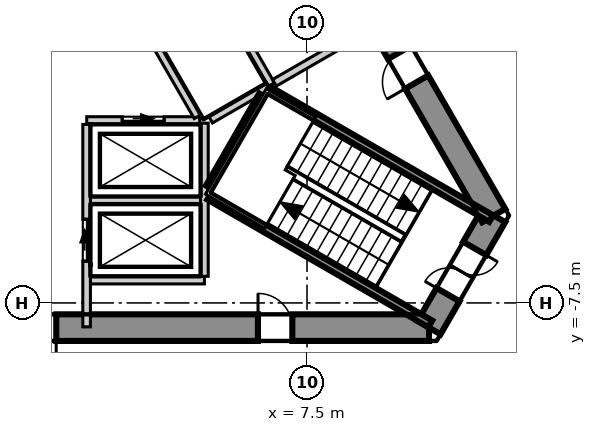
"""IFC4 building model, lengths in metres.
Left out: names, types, materials, properties, quantities, classifications, styles, units other than length and angle.
Written with IfcOpenShell. Run it as: python <this file> out.ifc"""

import sys

from ifc_helpers import new_model, si_unit, direction, frame, frame_2d, origin, place, context, subcontext, project, spatial, polyline, rectangle, outline, extrude, element, fill, save


model = new_model("IFC4")
c1 = context("Model", 3, precision=1e-05, world=origin(), true_north=direction((0.0, 1.0)))
c2 = subcontext(c1, "Body", "Model", "MODEL_VIEW")
j1 = project(units=[si_unit("LENGTHUNIT", "METRE"), si_unit("PLANEANGLEUNIT", "RADIAN")], contexts=[c1])
p1 = place(None, origin())
s1 = spatial("IfcSite", under=j1, at=p1, CompositionType="ELEMENT")
p2 = place(p1, origin())
s2 = spatial("IfcBuilding", under=s1, at=p2, CompositionType="ELEMENT")
p3 = place(p2, frame((0.0, 0.0, 215.3)))
s3 = spatial("IfcBuildingStorey", under=s2, at=p3, CompositionType="ELEMENT", Elevation=215.3)
p4 = place(p3, frame((-10.71, -8.15, -0.3), z_axis=(0.0, 0.0, 1.0), x_axis=(1.0, 0.0, 0.0)))
e1 = element("IfcWall", 1, at=p4, inside=s3, PredefinedType="SHEAR", context=c2, shape_type="SweptSolid", body=[
    extrude(outline(polyline([(-0.202, -0.35), (1.782, -0.35), (3.766, -0.35), (5.75, -0.35), (7.734, -0.35), (9.718, -0.35), (11.702, -0.35), (13.686, -0.35), (15.67, -0.35), (17.654, -0.35), (19.638, -0.35), (21.622, -0.35), (21.218, 0.35), (19.307, 0.35), (17.397, 0.35), (15.486, 0.35), (13.576, 0.35), (11.665, 0.35), (9.755, 0.35), (7.844, 0.35), (5.934, 0.35), (4.023, 0.35), (2.113, 0.35), (0.202, 0.35), (-0.202, -0.35)])), origin(), (0.0, 0.0, 1.0), 4.0),
])
p5 = place(p4, frame((9.81, 0.0, 0.3)))
e2 = element("IfcOpeningElement", 2, at=p5, cuts=e1, PredefinedType="OPENING", context=c2, shape_type="SweptSolid", body=[
    extrude(rectangle(XDim=1.8, YDim=2.1, at=frame_2d((0.9, 1.05))), frame((0.0, 0.36, 0.0), z_axis=(0.0, -1.0, 0.0), x_axis=(1.0, 0.0, 0.0)), (0.0, 0.0, 1.0), 0.72),
])
p6 = place(p4, frame((16.921, 0.0, 0.3)))
e3 = element("IfcOpeningElement", 3, at=p6, cuts=e1, PredefinedType="OPENING", context=c2, shape_type="SweptSolid", body=[
    extrude(rectangle(XDim=0.9, YDim=2.1, at=frame_2d((0.45, 1.05))), frame((0.0, 0.36, 0.0), z_axis=(0.0, -1.0, 0.0), x_axis=(1.0, 0.0, 0.0)), (0.0, 0.0, 1.0), 0.72),
])
p7 = place(p3, frame((10.71, -8.15, -0.3), z_axis=(0.0, 0.0, 1.0), x_axis=(0.49999337185, 0.866029230515, 0.0)))
e4 = element("IfcWall", 4, at=p7, inside=s3, PredefinedType="SHEAR", context=c2, shape_type="SweptSolid", body=[
    extrude(outline(polyline([(-0.202, -0.35), (1.703, -0.35), (3.608, -0.35), (3.204, 0.35), (1.703, 0.35), (0.202, 0.35), (-0.202, -0.35)])), origin(), (0.0, 0.0, 1.0), 4.0),
])
p8 = place(p7, frame((1.003, 0.0, 0.3)))
e5 = element("IfcOpeningElement", 5, at=p8, cuts=e4, PredefinedType="OPENING", context=c2, shape_type="SweptSolid", body=[
    extrude(rectangle(XDim=1.4, YDim=2.1, at=frame_2d((0.7, 1.05))), frame((0.0, 0.36, 0.0), z_axis=(0.0, -1.0, 0.0), x_axis=(1.0, 0.0, 0.0)), (0.0, 0.0, 1.0), 0.72),
])
p9 = place(p3, frame((12.413, -5.2, -0.3), z_axis=(0.0, 0.0, 1.0), x_axis=(-0.500011533395, 0.866018744874, 0.0)))
e6 = element("IfcWall", 6, at=p9, inside=s3, PredefinedType="SHEAR", context=c2, shape_type="SweptSolid", body=[
    extrude(outline(polyline([(-0.202, -0.35), (1.782, -0.35), (3.766, -0.35), (5.75, -0.35), (7.734, -0.35), (9.718, -0.35), (11.702, -0.35), (13.686, -0.35), (15.67, -0.35), (17.654, -0.35), (19.638, -0.35), (21.622, -0.35), (21.218, 0.35), (19.307, 0.35), (17.397, 0.35), (15.486, 0.35), (13.576, 0.35), (11.665, 0.35), (9.755, 0.35), (7.844, 0.35), (5.934, 0.35), (4.023, 0.35), (2.113, 0.35), (0.202, 0.35), (-0.202, -0.35)])), origin(), (0.0, 0.0, 1.0), 4.0),
])
p10 = place(p9, frame((4.055, 0.0, 0.3)))
e7 = element("IfcOpeningElement", 7, at=p10, cuts=e6, PredefinedType="OPENING", context=c2, shape_type="SweptSolid", body=[
    extrude(rectangle(XDim=0.9, YDim=2.1, at=frame_2d((0.45, 1.05))), frame((0.0, 0.36, 0.0), z_axis=(0.0, -1.0, 0.0), x_axis=(1.0, 0.0, 0.0)), (0.0, 0.0, 1.0), 0.72),
])
p11 = place(p9, frame((16.465, 0.0, 0.3)))
e8 = element("IfcOpeningElement", 8, at=p11, cuts=e6, PredefinedType="OPENING", context=c2, shape_type="SweptSolid", body=[
    extrude(rectangle(XDim=0.9, YDim=2.1, at=frame_2d((0.45, 1.05))), frame((0.0, 0.36, 0.0), z_axis=(0.0, -1.0, 0.0), x_axis=(1.0, 0.0, 0.0)), (0.0, 0.0, 1.0), 0.72),
])
p12 = place(p3, frame((28.243, -13.098, 0.0), z_axis=(0.0, 0.0, 1.0), x_axis=(-0.500001688958, 0.866024428662, 0.0)))
e9 = element("IfcWall", 9, at=p12, inside=s3, PredefinedType="ELEMENTEDWALL", context=c2, shape_type="SweptSolid", body=[
    extrude(rectangle(XDim=50.909, YDim=0.2, at=frame_2d((25.455, 0.0))), origin(), (0.0, 0.0, 1.0), 3.7),
])
p13 = place(p12, frame((2.223, 0.0, 0.9)))
e10 = element("IfcOpeningElement", 10, at=p13, cuts=e9, PredefinedType="OPENING", context=c2, shape_type="SweptSolid", body=[
    extrude(rectangle(XDim=4.2, YDim=2.5, at=frame_2d((2.1, 1.25))), frame((0.0, 0.11, 0.0), z_axis=(0.0, -1.0, 0.0), x_axis=(1.0, 0.0, 0.0)), (0.0, 0.0, 1.0), 0.22),
])
p14 = place(p12, frame((8.263, 0.0, 0.9)))
e11 = element("IfcOpeningElement", 11, at=p14, cuts=e9, PredefinedType="OPENING", context=c2, shape_type="SweptSolid", body=[
    extrude(rectangle(XDim=4.2, YDim=2.5, at=frame_2d((2.1, 1.25))), frame((0.0, 0.11, 0.0), z_axis=(0.0, -1.0, 0.0), x_axis=(1.0, 0.0, 0.0)), (0.0, 0.0, 1.0), 0.22),
])
p15 = place(p12, frame((14.304, 0.0, 0.9)))
e12 = element("IfcOpeningElement", 12, at=p15, cuts=e9, PredefinedType="OPENING", context=c2, shape_type="SweptSolid", body=[
    extrude(rectangle(XDim=4.2, YDim=2.5, at=frame_2d((2.1, 1.25))), frame((0.0, 0.11, 0.0), z_axis=(0.0, -1.0, 0.0), x_axis=(1.0, 0.0, 0.0)), (0.0, 0.0, 1.0), 0.22),
])
p16 = place(p12, frame((20.345, 0.0, 0.9)))
e13 = element("IfcOpeningElement", 13, at=p16, cuts=e9, PredefinedType="OPENING", context=c2, shape_type="SweptSolid", body=[
    extrude(rectangle(XDim=4.2, YDim=2.5, at=frame_2d((2.1, 1.25))), frame((0.0, 0.11, 0.0), z_axis=(0.0, -1.0, 0.0), x_axis=(1.0, 0.0, 0.0)), (0.0, 0.0, 1.0), 0.22),
])
p17 = place(p12, frame((26.385, 0.0, 0.9)))
e14 = element("IfcOpeningElement", 14, at=p17, cuts=e9, PredefinedType="OPENING", context=c2, shape_type="SweptSolid", body=[
    extrude(rectangle(XDim=4.2, YDim=2.5, at=frame_2d((2.1, 1.25))), frame((0.0, 0.11, 0.0), z_axis=(0.0, -1.0, 0.0), x_axis=(1.0, 0.0, 0.0)), (0.0, 0.0, 1.0), 0.22),
])
p18 = place(p12, frame((32.426, 0.0, 0.9)))
e15 = element("IfcOpeningElement", 15, at=p18, cuts=e9, PredefinedType="OPENING", context=c2, shape_type="SweptSolid", body=[
    extrude(rectangle(XDim=4.2, YDim=2.5, at=frame_2d((2.1, 1.25))), frame((0.0, 0.11, 0.0), z_axis=(0.0, -1.0, 0.0), x_axis=(1.0, 0.0, 0.0)), (0.0, 0.0, 1.0), 0.22),
])
p19 = place(p12, frame((38.466, 0.0, 0.9)))
e16 = element("IfcOpeningElement", 16, at=p19, cuts=e9, PredefinedType="OPENING", context=c2, shape_type="SweptSolid", body=[
    extrude(rectangle(XDim=4.2, YDim=2.5, at=frame_2d((2.1, 1.25))), frame((0.0, 0.11, 0.0), z_axis=(0.0, -1.0, 0.0), x_axis=(1.0, 0.0, 0.0)), (0.0, 0.0, 1.0), 0.22),
])
p20 = place(p12, frame((44.507, 0.0, 0.9)))
e17 = element("IfcOpeningElement", 17, at=p20, cuts=e9, PredefinedType="OPENING", context=c2, shape_type="SweptSolid", body=[
    extrude(rectangle(XDim=4.2, YDim=2.5, at=frame_2d((2.1, 1.25))), frame((0.0, 0.11, 0.0), z_axis=(0.0, -1.0, 0.0), x_axis=(1.0, 0.0, 0.0)), (0.0, 0.0, 1.0), 0.22),
])
p21 = place(p3, frame((0.075, 24.07, 0.0), z_axis=(0.0, 0.0, 1.0), x_axis=(0.500006834213, -0.866021458014, 0.0)))
e18 = element("IfcWall", 18, at=p21, inside=s3, PredefinedType="PARTITIONING", context=c2, shape_type="SweptSolid", body=[
    extrude(rectangle(XDim=41.616, YDim=0.15, at=frame_2d((20.808, 0.0))), origin(), (0.0, 0.0, 1.0), 3.7),
])
p22 = place(p21, frame((33.715, 0.0, 0.0)))
e19 = element("IfcOpeningElement", 19, at=p22, cuts=e18, PredefinedType="OPENING", context=c2, shape_type="SweptSolid", body=[
    extrude(rectangle(XDim=1.1, YDim=2.1, at=frame_2d((0.55, 1.05))), frame((0.0, 0.085, 0.0), z_axis=(0.0, -1.0, 0.0), x_axis=(1.0, 0.0, 0.0)), (0.0, 0.0, 1.0), 0.17),
])
p23 = place(p21, frame((22.098, 0.0, 0.0)))
e20 = element("IfcOpeningElement", 20, at=p23, cuts=e18, PredefinedType="OPENING", context=c2, shape_type="SweptSolid", body=[
    extrude(rectangle(XDim=1.0, YDim=2.1, at=frame_2d((0.5, 1.05))), frame((0.0, 0.085, 0.0), z_axis=(0.0, -1.0, 0.0), x_axis=(1.0, 0.0, 0.0)), (0.0, 0.0, 1.0), 0.17),
])
p24 = place(p21, frame((25.198, 0.0, 0.0)))
e21 = element("IfcOpeningElement", 21, at=p24, cuts=e18, PredefinedType="OPENING", context=c2, shape_type="SweptSolid", body=[
    extrude(rectangle(XDim=0.9, YDim=2.1, at=frame_2d((0.45, 1.05))), frame((0.0, 0.085, 0.0), z_axis=(0.0, -1.0, 0.0), x_axis=(1.0, 0.0, 0.0)), (0.0, 0.0, 1.0), 0.17),
])
p25 = place(p21, frame((9.858, 0.0, 0.0)))
e22 = element("IfcOpeningElement", 22, at=p25, cuts=e18, PredefinedType="OPENING", context=c2, shape_type="SweptSolid", body=[
    extrude(rectangle(XDim=1.1, YDim=2.1, at=frame_2d((0.55, 1.05))), frame((0.0, 0.085, 0.0), z_axis=(0.0, -1.0, 0.0), x_axis=(1.0, 0.0, 0.0)), (0.0, 0.0, 1.0), 0.17),
])
p26 = place(p21, frame((18.758, 0.0, 0.0)))
e23 = element("IfcOpeningElement", 23, at=p26, cuts=e18, PredefinedType="OPENING", context=c2, shape_type="SweptSolid", body=[
    extrude(rectangle(XDim=0.9, YDim=2.1, at=frame_2d((0.45, 1.05))), frame((0.0, 0.085, 0.0), z_axis=(0.0, -1.0, 0.0), x_axis=(1.0, 0.0, 0.0)), (0.0, 0.0, 1.0), 0.17),
])
p27 = place(p21, frame((15.558, 0.0, 0.0)))
e24 = element("IfcOpeningElement", 24, at=p27, cuts=e18, PredefinedType="OPENING", context=c2, shape_type="SweptSolid", body=[
    extrude(rectangle(XDim=0.9, YDim=2.1, at=frame_2d((0.45, 1.05))), frame((0.0, 0.085, 0.0), z_axis=(0.0, -1.0, 0.0), x_axis=(1.0, 0.0, 0.0)), (0.0, 0.0, 1.0), 0.17),
])
p28 = place(p21, frame((12.658, 0.0, 0.0)))
e25 = element("IfcOpeningElement", 25, at=p28, cuts=e18, PredefinedType="OPENING", context=c2, shape_type="SweptSolid", body=[
    extrude(rectangle(XDim=1.0, YDim=2.1, at=frame_2d((0.5, 1.05))), frame((0.0, 0.085, 0.0), z_axis=(0.0, -1.0, 0.0), x_axis=(1.0, 0.0, 0.0)), (0.0, 0.0, 1.0), 0.17),
])
p29 = place(p21, frame((3.776, 0.0, 0.0)))
e26 = element("IfcOpeningElement", 26, at=p29, cuts=e18, PredefinedType="OPENING", context=c2, shape_type="SweptSolid", body=[
    extrude(rectangle(XDim=1.1, YDim=2.1, at=frame_2d((0.55, 1.05))), frame((0.0, 0.085, 0.0), z_axis=(0.0, -1.0, 0.0), x_axis=(1.0, 0.0, 0.0)), (0.0, 0.0, 1.0), 0.17),
])
p30 = place(p3, frame((1.8, -4.8, 0.0), z_axis=(0.0, 0.0, 1.0), x_axis=(1.0, 0.0, 0.0)))
e27 = element("IfcWall", 27, at=p30, inside=s3, PredefinedType="SOLIDWALL", context=c2, shape_type="SweptSolid", body=[
    extrude(rectangle(XDim=2.9, YDim=0.2, at=frame_2d((1.45, 0.0))), origin(), (0.0, 0.0, 1.0), 3.7),
])
p31 = place(p3, frame((1.8, -6.9, 0.0), z_axis=(0.0, 0.0, 1.0), x_axis=(1.0, 0.0, 0.0)))
e28 = element("IfcWall", 28, at=p31, inside=s3, PredefinedType="SOLIDWALL", context=c2, shape_type="SweptSolid", body=[
    extrude(rectangle(XDim=3.0, YDim=0.2, at=frame_2d((1.5, 0.0))), origin(), (0.0, 0.0, 1.0), 3.7),
])
p32 = place(p3, frame((1.703, -2.7, 0.0), z_axis=(0.0, 0.0, 1.0), x_axis=(1.0, 0.0, 0.0)))
e29 = element("IfcWall", 29, at=p32, inside=s3, PredefinedType="SOLIDWALL", context=c2, shape_type="SweptSolid", body=[
    extrude(rectangle(XDim=2.973, YDim=0.2, at=frame_2d((1.487, 0.0))), origin(), (0.0, 0.0, 1.0), 3.7),
])
p33 = place(p32, frame((0.936, 0.0, 0.0)))
e30 = element("IfcOpeningElement", 30, at=p33, cuts=e29, PredefinedType="OPENING", context=c2, shape_type="SweptSolid", body=[
    extrude(rectangle(XDim=1.1, YDim=2.1, at=frame_2d((0.55, 1.05))), frame((0.0, 0.11, 0.0), z_axis=(0.0, -1.0, 0.0), x_axis=(1.0, 0.0, 0.0)), (0.0, 0.0, 1.0), 0.22),
])
p34 = place(p3, frame((3.19, -0.125, 0.0), z_axis=(0.0, 0.0, 1.0), x_axis=(0.499988658015, -0.866031951983, 0.0)))
e31 = element("IfcWall", 31, at=p34, inside=s3, PredefinedType="SOLIDWALL", context=c2, shape_type="SweptSolid", body=[
    extrude(rectangle(XDim=2.858, YDim=0.2, at=frame_2d((1.429, 0.0))), origin(), (0.0, 0.0, 1.0), 3.7),
])
p35 = place(p3, frame((1.7, -8.13, 0.0), z_axis=(0.0, 0.0, 1.0), x_axis=(0.0, 1.0, 0.0)))
e32 = element("IfcWall", 32, at=p35, inside=s3, PredefinedType="SOLIDWALL", context=c2, shape_type="SweptSolid", body=[
    extrude(rectangle(XDim=5.327, YDim=0.2, at=frame_2d((2.664, 0.0))), origin(), (0.0, 0.0, 1.0), 3.7),
])
p36 = place(p35, frame((1.73, 0.0, 0.0)))
e33 = element("IfcOpeningElement", 33, at=p36, cuts=e32, PredefinedType="OPENING", context=c2, shape_type="SweptSolid", body=[
    extrude(rectangle(XDim=1.1, YDim=2.1, at=frame_2d((0.55, 1.05))), frame((0.0, 0.11, 0.0), z_axis=(0.0, -1.0, 0.0), x_axis=(1.0, 0.0, 0.0)), (0.0, 0.0, 1.0), 0.22),
])
p37 = place(p3, frame((4.8, -6.8, 0.0), z_axis=(0.0, 0.0, 1.0), x_axis=(0.0, 1.0, 0.0)))
e34 = element("IfcWall", 34, at=p37, inside=s3, PredefinedType="SOLIDWALL", context=c2, shape_type="SweptSolid", body=[
    extrude(rectangle(XDim=4.031, YDim=0.2, at=frame_2d((2.016, 0.0))), origin(), (0.0, 0.0, 1.0), 3.7),
])
p38 = place(p3, frame((5.057, 0.841, 0.0), z_axis=(0.0, 0.0, 1.0), x_axis=(0.499990139034, -0.866031096941, 0.0)))
e35 = element("IfcWall", 35, at=p38, inside=s3, PredefinedType="SOLIDWALL", context=c2, shape_type="SweptSolid", body=[
    extrude(rectangle(XDim=3.0, YDim=0.2, at=frame_2d((1.5, 0.0))), origin(), (0.0, 0.0, 1.0), 3.7),
])
p39 = place(p3, frame((4.963, -2.677, 0.0), z_axis=(0.0, 0.0, 1.0), x_axis=(0.866024383922, 0.50000176645, 0.0)))
e36 = element("IfcWall", 36, at=p39, inside=s3, PredefinedType="SOLIDWALL", context=c2, shape_type="SweptSolid", body=[
    extrude(rectangle(XDim=1.74, YDim=0.2, at=frame_2d((0.87, 0.0))), origin(), (0.0, 0.0, 1.0), 3.7),
])
p40 = place(p3, frame((6.642, -1.708, 0.0), z_axis=(0.0, 0.0, 1.0), x_axis=(0.866043441391, 0.499968756647, 0.0)))
e37 = element("IfcWall", 37, at=p40, inside=s3, PredefinedType="SOLIDWALL", context=c2, shape_type="SweptSolid", body=[
    extrude(rectangle(XDim=2.002, YDim=0.2, at=frame_2d((1.001, 0.0))), origin(), (0.0, 0.0, 1.0), 3.7),
])
p41 = place(p3, frame((4.929, -4.462, 0.0), z_axis=(0.0, 0.0, 1.0), x_axis=(0.500200581029, 0.865909567298, 0.0)))
e38 = element("IfcWall", 38, at=p41, inside=s3, PredefinedType="SOLIDWALL", context=c2, shape_type="SweptSolid", body=[
    extrude(rectangle(XDim=2.799, YDim=0.2, at=frame_2d((1.399, 0.0))), origin(), (0.0, 0.0, 1.0), 3.7),
])
p42 = place(p3, frame((6.529, -1.922, 0.0), z_axis=(0.0, 0.0, 1.0), x_axis=(0.866046323291, -0.499963764601, 0.0)))
e39 = element("IfcWall", 39, at=p42, inside=s3, PredefinedType="SOLIDWALL", context=c2, shape_type="SweptSolid", body=[
    extrude(rectangle(XDim=6.714, YDim=0.2, at=frame_2d((3.357, 0.0))), origin(), (0.0, 0.0, 1.0), 3.7),
])
p43 = place(p3, frame((4.929, -4.693, 0.0), z_axis=(0.0, 0.0, 1.0), x_axis=(0.865983344943, -0.500072840975, 0.0)))
e40 = element("IfcWall", 40, at=p43, inside=s3, PredefinedType="SOLIDWALL", context=c2, shape_type="SweptSolid", body=[
    extrude(rectangle(XDim=6.715, YDim=0.2, at=frame_2d((3.357, 0.0))), origin(), (0.0, 0.0, 1.0), 3.7),
])
p44 = place(p33, origin())
e41 = element("IfcDoor", 41, at=p44, inside=s3, OperationType="SLIDING_TO_LEFT", PredefinedType="DOOR", context=c2, shape_type="SweptSolid", body=[
    extrude(rectangle(XDim=1.1, YDim=2.1, at=frame_2d((0.55, 1.05))), frame((0.0, 0.025, 0.0), z_axis=(0.0, -1.0, 0.0), x_axis=(1.0, 0.0, 0.0)), (0.0, 0.0, 1.0), 0.05),
])
fill(e30, e41)
p45 = place(p36, origin())
e42 = element("IfcDoor", 42, at=p45, inside=s3, OperationType="SLIDING_TO_LEFT", PredefinedType="DOOR", context=c2, shape_type="SweptSolid", body=[
    extrude(rectangle(XDim=1.1, YDim=2.1, at=frame_2d((0.55, 1.05))), frame((0.0, 0.025, 0.0), z_axis=(0.0, -1.0, 0.0), x_axis=(1.0, 0.0, 0.0)), (0.0, 0.0, 1.0), 0.05),
])
fill(e33, e42)
p46 = place(p5, origin())
e43 = element("IfcDoor", 43, at=p46, inside=s3, OperationType="DOUBLE_DOOR_SINGLE_SWING", PredefinedType="DOOR", context=c2, shape_type="SweptSolid", body=[
    extrude(rectangle(XDim=1.8, YDim=2.1, at=frame_2d((0.9, 1.05))), frame((0.0, 0.025, 0.0), z_axis=(0.0, -1.0, 0.0), x_axis=(1.0, 0.0, 0.0)), (0.0, 0.0, 1.0), 0.05),
])
fill(e2, e43)
p47 = place(p8, origin())
e44 = element("IfcDoor", 44, at=p47, inside=s3, OperationType="DOUBLE_DOOR_SINGLE_SWING", PredefinedType="DOOR", context=c2, shape_type="SweptSolid", body=[
    extrude(rectangle(XDim=1.4, YDim=2.1, at=frame_2d((0.7, 1.05))), frame((0.0, 0.025, 0.0), z_axis=(0.0, -1.0, 0.0), x_axis=(1.0, 0.0, 0.0)), (0.0, 0.0, 1.0), 0.05),
])
fill(e5, e44)
p48 = place(p6, origin())
e45 = element("IfcDoor", 45, at=p48, inside=s3, OperationType="SINGLE_SWING_RIGHT", PredefinedType="DOOR", context=c2, shape_type="SweptSolid", body=[
    extrude(rectangle(XDim=0.9, YDim=2.1, at=frame_2d((0.45, 1.05))), frame((0.0, 0.025, 0.0), z_axis=(0.0, -1.0, 0.0), x_axis=(1.0, 0.0, 0.0)), (0.0, 0.0, 1.0), 0.05),
])
fill(e3, e45)
p49 = place(p10, origin())
e46 = element("IfcDoor", 46, at=p49, inside=s3, OperationType="SINGLE_SWING_RIGHT", PredefinedType="DOOR", context=c2, shape_type="SweptSolid", body=[
    extrude(rectangle(XDim=0.9, YDim=2.1, at=frame_2d((0.45, 1.05))), frame((0.0, 0.025, 0.0), z_axis=(0.0, -1.0, 0.0), x_axis=(1.0, 0.0, 0.0)), (0.0, 0.0, 1.0), 0.05),
])
fill(e7, e46)
save(model, sys.argv[1])
